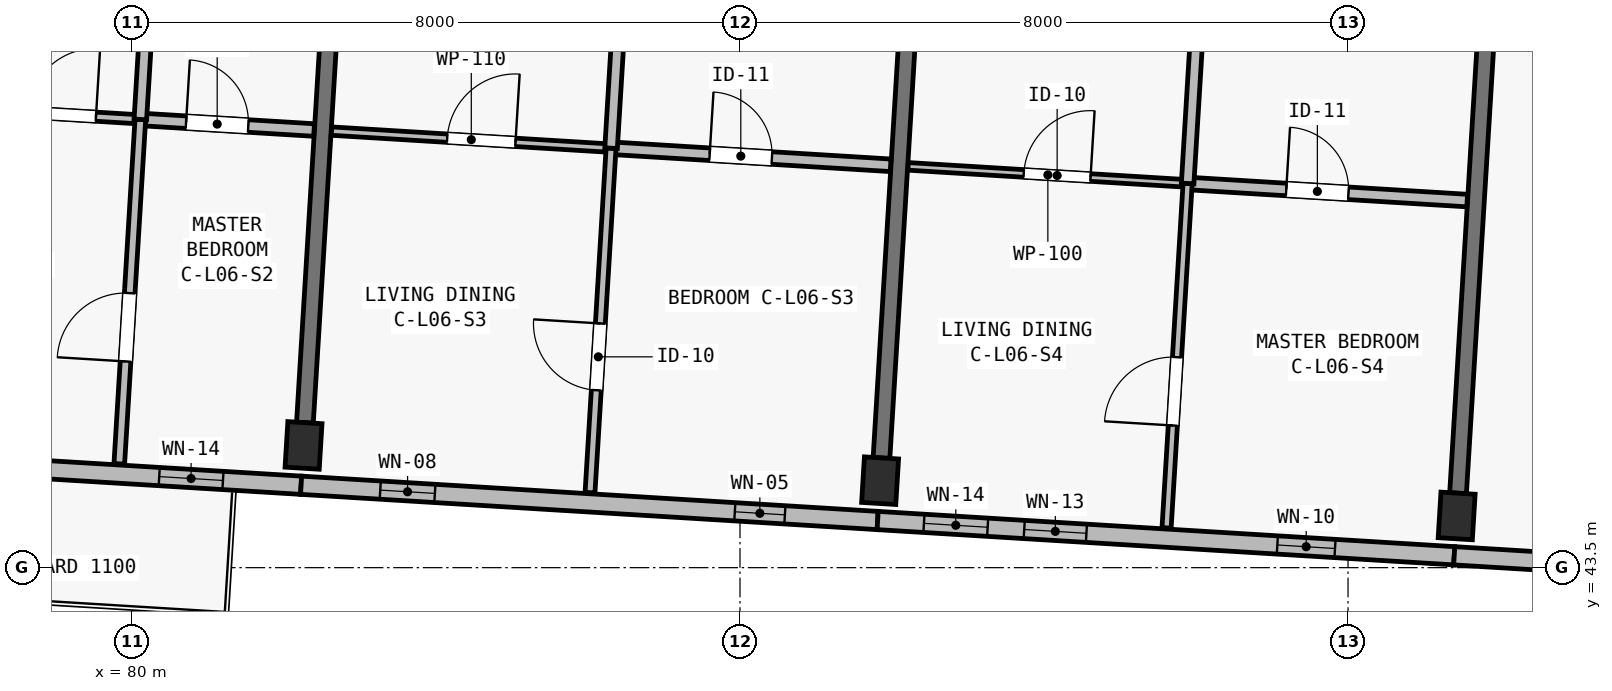
"""IFC4 building model, lengths in metres.
Left out: names, types, materials, properties, quantities, classifications, styles, units other than length and angle.
Written with IfcOpenShell. Run it as: python <this file> out.ifc"""

import sys

from ifc_helpers import new_model, si_unit, direction, frame, frame_2d, origin, origin_2d, place, context, subcontext, project, spatial, rectangle, extrude, element, fill, save


model = new_model("IFC4")
c1 = context("Model", 3, precision=1e-05, world=origin(), true_north=direction((0.0, 1.0)))
c2 = subcontext(c1, "Body", "Model", "MODEL_VIEW")
j1 = project(units=[si_unit("LENGTHUNIT", "METRE"), si_unit("PLANEANGLEUNIT", "RADIAN")], contexts=[c1])
p1 = place(None, origin())
s1 = spatial("IfcSite", under=j1, at=p1, CompositionType="ELEMENT")
p2 = place(p1, origin())
s2 = spatial("IfcBuilding", under=s1, at=p2, CompositionType="ELEMENT")
p3 = place(p2, frame((0.0, 0.0, 21.4)))
s3 = spatial("IfcBuildingStorey", under=s2, at=p3, CompositionType="ELEMENT", Elevation=21.4)
for number, where, z_axis, x_axis in (
    (1, (82.258, 45.108, 0.0), (0.0, 0.0, 1.0), (0.998, -0.061, 0.0)),
    (2, (89.843, 44.644, 0.0), (0.0, 0.0, 1.0), (0.998, -0.061, 0.0)),
    (3, (97.429, 44.18, 0.0), (0.0, 0.0, 1.0), (0.998, -0.061, 0.0)),
):
    element("IfcColumn", number, at=place(p3, frame(where, z_axis=z_axis, x_axis=x_axis)), inside=s3, PredefinedType="COLUMN", context=c2, shape_type="SweptSolid", body=[
        extrude(rectangle(XDim=0.45, YDim=0.6, at=origin_2d()), origin(), (0.0, 0.0, 1.0), 3.25),
    ])
for number, where, z_axis, x_axis in (
    (4, (82.276, 45.407, 0.0), (0.0, 0.0, 1.0), (0.061, 0.998, 0.0)),
    (5, (89.862, 44.944, 0.0), (0.0, 0.0, 1.0), (0.061, 0.998, 0.0)),
    (6, (97.448, 44.479, 0.0), (0.0, 0.0, 1.0), (0.061, 0.998, 0.0)),
):
    element("IfcWall", number, at=place(p3, frame(where, z_axis=z_axis, x_axis=x_axis)), inside=s3, PredefinedType="SHEAR", context=c2, shape_type="SweptSolid", body=[
        extrude(rectangle(XDim=7.0, YDim=0.22, at=frame_2d((3.5, 0.0))), origin(), (0.0, 0.0, 1.0), 2.5),
    ])
p4 = place(p3, frame((82.225, 44.584, 0.0), z_axis=(0.0, 0.0, 1.0), x_axis=(-0.998133591969, 0.061068261669, 0.0)))
e7 = element("IfcWall", 7, at=p4, inside=s3, PredefinedType="SOLIDWALL", context=c2, shape_type="SweptSolid", body=[
    extrude(rectangle(XDim=7.6, YDim=0.24, at=frame_2d((3.8, 0.0))), origin(), (0.0, 0.0, 1.0), 3.0),
])
p5 = place(p4, frame((5.169, 0.0, 0.0)))
e8 = element("IfcOpeningElement", 8, at=p5, cuts=e7, PredefinedType="OPENING", context=c2, shape_type="SweptSolid", body=[
    extrude(rectangle(XDim=1.5, YDim=2.12, at=frame_2d((0.75, 1.06))), frame((0.0, 0.135, 0.0), z_axis=(0.0, -1.0, 0.0), x_axis=(1.0, 0.0, 0.0)), (0.0, 0.0, 1.0), 0.27),
])
p6 = place(p4, frame((1.03, 0.0, 0.5)))
e9 = element("IfcOpeningElement", 9, at=p6, cuts=e7, PredefinedType="OPENING", context=c2, shape_type="SweptSolid", body=[
    extrude(rectangle(XDim=0.84, YDim=2.28, at=frame_2d((0.42, 1.14))), frame((0.0, 0.135, 0.0), z_axis=(0.0, -1.0, 0.0), x_axis=(1.0, 0.0, 0.0)), (0.0, 0.0, 1.0), 0.27),
])
p7 = place(p3, frame((89.811, 44.12, 0.0), z_axis=(0.0, 0.0, 1.0), x_axis=(-0.998135669243, 0.061034300063, 0.0)))
e10 = element("IfcWall", 10, at=p7, inside=s3, PredefinedType="SOLIDWALL", context=c2, shape_type="SweptSolid", body=[
    extrude(rectangle(XDim=7.6, YDim=0.24, at=frame_2d((3.8, 0.0))), origin(), (0.0, 0.0, 1.0), 3.0),
])
p8 = place(p7, frame((1.223, 0.0, 0.42)))
e11 = element("IfcOpeningElement", 11, at=p8, cuts=e10, PredefinedType="OPENING", context=c2, shape_type="SweptSolid", body=[
    extrude(rectangle(XDim=0.66, YDim=2.32, at=frame_2d((0.33, 1.16))), frame((0.0, 0.135, 0.0), z_axis=(0.0, -1.0, 0.0), x_axis=(1.0, 0.0, 0.0)), (0.0, 0.0, 1.0), 0.27),
])
p9 = place(p7, frame((5.837, 0.0, 0.42)))
e12 = element("IfcOpeningElement", 12, at=p9, cuts=e10, PredefinedType="OPENING", context=c2, shape_type="SweptSolid", body=[
    extrude(rectangle(XDim=0.72, YDim=2.16, at=frame_2d((0.36, 1.08))), frame((0.0, 0.135, 0.0), z_axis=(0.0, -1.0, 0.0), x_axis=(1.0, 0.0, 0.0)), (0.0, 0.0, 1.0), 0.27),
])
p10 = place(p3, frame((97.397, 43.656, 0.0), z_axis=(0.0, 0.0, 1.0), x_axis=(-0.998135549572, 0.061036257095, 0.0)))
e13 = element("IfcWall", 13, at=p10, inside=s3, PredefinedType="SOLIDWALL", context=c2, shape_type="SweptSolid", body=[
    extrude(rectangle(XDim=7.6, YDim=0.24, at=frame_2d((3.8, 0.0))), origin(), (0.0, 0.0, 1.0), 3.0),
])
p11 = place(p10, frame((1.571, 0.0, 0.48)))
e14 = element("IfcOpeningElement", 14, at=p11, cuts=e13, PredefinedType="OPENING", context=c2, shape_type="SweptSolid", body=[
    extrude(rectangle(XDim=0.76, YDim=2.34, at=frame_2d((0.38, 1.17))), frame((0.0, 0.135, 0.0), z_axis=(0.0, -1.0, 0.0), x_axis=(1.0, 0.0, 0.0)), (0.0, 0.0, 1.0), 0.27),
])
p12 = place(p10, frame((4.848, 0.0, 0.48)))
e15 = element("IfcOpeningElement", 15, at=p12, cuts=e13, PredefinedType="OPENING", context=c2, shape_type="SweptSolid", body=[
    extrude(rectangle(XDim=0.82, YDim=2.18, at=frame_2d((0.41, 1.09))), frame((0.0, 0.135, 0.0), z_axis=(0.0, -1.0, 0.0), x_axis=(1.0, 0.0, 0.0)), (0.0, 0.0, 1.0), 0.27),
])
p13 = place(p10, frame((6.15, 0.0, 0.52)))
e16 = element("IfcOpeningElement", 16, at=p13, cuts=e13, PredefinedType="OPENING", context=c2, shape_type="SweptSolid", body=[
    extrude(rectangle(XDim=0.84, YDim=2.28, at=frame_2d((0.42, 1.14))), frame((0.0, 0.135, 0.0), z_axis=(0.0, -1.0, 0.0), x_axis=(1.0, 0.0, 0.0)), (0.0, 0.0, 1.0), 0.27),
])
p14 = place(p3, frame((105.507, 43.16, 0.0), z_axis=(0.0, 0.0, 1.0), x_axis=(-0.998134248939, 0.061057522844, 0.0)))
e17 = element("IfcWall", 17, at=p14, inside=s3, PredefinedType="SOLIDWALL", context=c2, shape_type="SweptSolid", body=[
    extrude(rectangle(XDim=8.125, YDim=0.24, at=frame_2d((4.062, 0.0))), origin(), (0.0, 0.0, 1.0), 3.0),
])
p15 = place(p14, frame((1.682, 0.0, 0.5)))
e18 = element("IfcOpeningElement", 18, at=p15, cuts=e17, PredefinedType="OPENING", context=c2, shape_type="SweptSolid", body=[
    extrude(rectangle(XDim=0.86, YDim=2.36, at=frame_2d((0.43, 1.18))), frame((0.0, 0.135, 0.0), z_axis=(0.0, -1.0, 0.0), x_axis=(1.0, 0.0, 0.0)), (0.0, 0.0, 1.0), 0.27),
])
p16 = place(p14, frame((4.347, 0.0, 0.52)))
e19 = element("IfcOpeningElement", 19, at=p16, cuts=e17, PredefinedType="OPENING", context=c2, shape_type="SweptSolid", body=[
    extrude(rectangle(XDim=0.62, YDim=2.28, at=frame_2d((0.31, 1.14))), frame((0.0, 0.135, 0.0), z_axis=(0.0, -1.0, 0.0), x_axis=(1.0, 0.0, 0.0)), (0.0, 0.0, 1.0), 0.27),
])
p17 = place(p3, frame((75.04, 49.707, 0.0), z_axis=(0.0, 0.0, 1.0), x_axis=(0.998135637207, -0.061034823981, 0.0)))
e20 = element("IfcWall", 20, at=p17, inside=s3, PredefinedType="PARTITIONING", context=c2, shape_type="SweptSolid", body=[
    extrude(rectangle(XDim=5.08, YDim=0.12, at=frame_2d((2.54, 0.0))), origin(), (0.0, 0.0, 1.0), 2.97),
])
p18 = place(p17, frame((3.595, 0.0, 0.0)))
e21 = element("IfcOpeningElement", 21, at=p18, cuts=e20, PredefinedType="OPENING", context=c2, shape_type="SweptSolid", body=[
    extrude(rectangle(XDim=0.9, YDim=2.1, at=frame_2d((0.45, 1.05))), frame((0.0, 0.075, 0.0), z_axis=(0.0, -1.0, 0.0), x_axis=(1.0, 0.0, 0.0)), (0.0, 0.0, 1.0), 0.15),
])
p19 = place(p3, frame((80.11, 49.397, 0.0), z_axis=(0.0, 0.0, 1.0), x_axis=(0.99813222782, -0.061090553999, 0.0)))
e22 = element("IfcWall", 22, at=p19, inside=s3, PredefinedType="PLUMBINGWALL", context=c2, shape_type="SweptSolid", body=[
    extrude(rectangle(XDim=2.29, YDim=0.165, at=frame_2d((1.145, 0.0))), origin(), (0.0, 0.0, 1.0), 2.97),
])
p20 = place(p19, frame((0.603, 0.0, 0.0)))
e23 = element("IfcOpeningElement", 23, at=p20, cuts=e22, PredefinedType="OPENING", context=c2, shape_type="SweptSolid", body=[
    extrude(rectangle(XDim=0.82, YDim=2.08, at=frame_2d((0.41, 1.04))), frame((0.0, 0.097, 0.0), z_axis=(0.0, -1.0, 0.0), x_axis=(1.0, 0.0, 0.0)), (0.0, 0.0, 1.0), 0.195),
])
p21 = place(p3, frame((79.833, 44.866, 0.0), z_axis=(0.0, 0.0, 1.0), x_axis=(0.061035713941, 0.998135582786, 0.0)))
e24 = element("IfcWall", 24, at=p21, inside=s3, PredefinedType="PARTITIONING", context=c2, shape_type="SweptSolid", body=[
    extrude(rectangle(XDim=4.54, YDim=0.14, at=frame_2d((2.27, 0.0))), origin(), (0.0, 0.0, 1.0), 2.97),
])
p22 = place(p21, frame((1.35, 0.0, 0.0)))
e25 = element("IfcOpeningElement", 25, at=p22, cuts=e24, PredefinedType="OPENING", context=c2, shape_type="SweptSolid", body=[
    extrude(rectangle(XDim=0.9, YDim=2.1, at=frame_2d((0.45, 1.05))), frame((0.0, 0.085, 0.0), z_axis=(0.0, -1.0, 0.0), x_axis=(1.0, 0.0, 0.0)), (0.0, 0.0, 1.0), 0.17),
])
p23 = place(p3, frame((80.11, 49.397, 0.0), z_axis=(0.0, 0.0, 1.0), x_axis=(0.061066453301, 0.998133702608, 0.0)))
e26 = element("IfcWall", 26, at=p23, inside=s3, PredefinedType="PLUMBINGWALL", context=c2, shape_type="SweptSolid", body=[
    extrude(rectangle(XDim=3.87, YDim=0.165, at=frame_2d((1.935, 0.0))), origin(), (0.0, 0.0, 1.0), 2.97),
])
p24 = place(p3, frame((82.625, 49.243, 0.0), z_axis=(0.0, 0.0, 1.0), x_axis=(0.998132682596, -0.061083123148, 0.0)))
e27 = element("IfcWall", 27, at=p24, inside=s3, PredefinedType="PARTITIONING", context=c2, shape_type="SweptSolid", body=[
    extrude(rectangle(XDim=3.685, YDim=0.11, at=frame_2d((1.843, 0.0))), origin(), (0.0, 0.0, 1.0), 2.97),
])
p25 = place(p24, frame((1.525, 0.0, 0.0)))
e28 = element("IfcOpeningElement", 28, at=p25, cuts=e27, PredefinedType="OPENING", context=c2, shape_type="SweptSolid", body=[
    extrude(rectangle(XDim=0.9, YDim=2.1, at=frame_2d((0.45, 1.05))), frame((0.0, 0.07, 0.0), z_axis=(0.0, -1.0, 0.0), x_axis=(1.0, 0.0, 0.0)), (0.0, 0.0, 1.0), 0.14),
])
p26 = place(p3, frame((86.304, 49.018, 0.0), z_axis=(0.0, 0.0, 1.0), x_axis=(0.998136719672, -0.061017119263, 0.0)))
e29 = element("IfcWall", 29, at=p26, inside=s3, PredefinedType="PLUMBINGWALL", context=c2, shape_type="SweptSolid", body=[
    extrude(rectangle(XDim=3.685, YDim=0.165, at=frame_2d((1.843, 0.0))), origin(), (0.0, 0.0, 1.0), 2.97),
])
p27 = place(p26, frame((1.3, 0.0, 0.0)))
e30 = element("IfcOpeningElement", 30, at=p27, cuts=e29, PredefinedType="OPENING", context=c2, shape_type="SweptSolid", body=[
    extrude(rectangle(XDim=0.82, YDim=2.08, at=frame_2d((0.41, 1.04))), frame((0.0, 0.097, 0.0), z_axis=(0.0, -1.0, 0.0), x_axis=(1.0, 0.0, 0.0)), (0.0, 0.0, 1.0), 0.195),
])
p28 = place(p3, frame((86.027, 44.487, 0.0), z_axis=(0.0, 0.0, 1.0), x_axis=(0.061035713941, 0.998135582786, 0.0)))
e31 = element("IfcWall", 31, at=p28, inside=s3, PredefinedType="PARTITIONING", context=c2, shape_type="SweptSolid", body=[
    extrude(rectangle(XDim=4.54, YDim=0.13, at=frame_2d((2.27, 0.0))), origin(), (0.0, 0.0, 1.0), 2.97),
])
p29 = place(p28, frame((1.35, 0.0, 0.0)))
e32 = element("IfcOpeningElement", 32, at=p29, cuts=e31, PredefinedType="OPENING", context=c2, shape_type="SweptSolid", body=[
    extrude(rectangle(XDim=0.88, YDim=2.1, at=frame_2d((0.44, 1.05))), frame((0.0, 0.08, 0.0), z_axis=(0.0, -1.0, 0.0), x_axis=(1.0, 0.0, 0.0)), (0.0, 0.0, 1.0), 0.16),
])
p30 = place(p3, frame((86.304, 49.018, 0.0), z_axis=(0.0, 0.0, 1.0), x_axis=(0.061066453301, 0.998133702608, 0.0)))
e33 = element("IfcWall", 33, at=p30, inside=s3, PredefinedType="PLUMBINGWALL", context=c2, shape_type="SweptSolid", body=[
    extrude(rectangle(XDim=3.87, YDim=0.165, at=frame_2d((1.935, 0.0))), origin(), (0.0, 0.0, 1.0), 2.97),
])
p31 = place(p3, frame((90.211, 48.779, 0.0), z_axis=(0.0, 0.0, 1.0), x_axis=(0.998136719672, -0.061017119263, 0.0)))
e34 = element("IfcWall", 34, at=p31, inside=s3, PredefinedType="PARTITIONING", context=c2, shape_type="SweptSolid", body=[
    extrude(rectangle(XDim=3.685, YDim=0.1, at=frame_2d((1.843, 0.0))), origin(), (0.0, 0.0, 1.0), 2.97),
])
p32 = place(p31, frame((1.525, 0.0, 0.0)))
e35 = element("IfcOpeningElement", 35, at=p32, cuts=e34, PredefinedType="OPENING", context=c2, shape_type="SweptSolid", body=[
    extrude(rectangle(XDim=0.88, YDim=2.1, at=frame_2d((0.44, 1.05))), frame((0.0, 0.065, 0.0), z_axis=(0.0, -1.0, 0.0), x_axis=(1.0, 0.0, 0.0)), (0.0, 0.0, 1.0), 0.13),
])
p33 = place(p3, frame((93.89, 48.554, 0.0), z_axis=(0.0, 0.0, 1.0), x_axis=(0.99813243538, -0.061087162657, 0.0)))
e36 = element("IfcWall", 36, at=p33, inside=s3, PredefinedType="PLUMBINGWALL", context=c2, shape_type="SweptSolid", body=[
    extrude(rectangle(XDim=3.685, YDim=0.165, at=frame_2d((1.842, 0.0))), origin(), (0.0, 0.0, 1.0), 2.97),
])
p34 = place(p33, frame((1.3, 0.0, 0.0)))
e37 = element("IfcOpeningElement", 37, at=p34, cuts=e36, PredefinedType="OPENING", context=c2, shape_type="SweptSolid", body=[
    extrude(rectangle(XDim=0.82, YDim=2.08, at=frame_2d((0.41, 1.04))), frame((0.0, 0.097, 0.0), z_axis=(0.0, -1.0, 0.0), x_axis=(1.0, 0.0, 0.0)), (0.0, 0.0, 1.0), 0.195),
])
p35 = place(p3, frame((93.612, 44.023, 0.0), z_axis=(0.0, 0.0, 1.0), x_axis=(0.061089289302, 0.998132305224, 0.0)))
e38 = element("IfcWall", 38, at=p35, inside=s3, PredefinedType="PARTITIONING", context=c2, shape_type="SweptSolid", body=[
    extrude(rectangle(XDim=4.54, YDim=0.12, at=frame_2d((2.27, 0.0))), origin(), (0.0, 0.0, 1.0), 2.97),
])
p36 = place(p35, frame((1.35, 0.0, 0.0)))
e39 = element("IfcOpeningElement", 39, at=p36, cuts=e38, PredefinedType="OPENING", context=c2, shape_type="SweptSolid", body=[
    extrude(rectangle(XDim=0.9, YDim=2.1, at=frame_2d((0.45, 1.05))), frame((0.0, 0.075, 0.0), z_axis=(0.0, -1.0, 0.0), x_axis=(1.0, 0.0, 0.0)), (0.0, 0.0, 1.0), 0.15),
])
p37 = place(p3, frame((93.89, 48.554, 0.0), z_axis=(0.0, 0.0, 1.0), x_axis=(0.06100360301, 0.998137545842, 0.0)))
e40 = element("IfcWall", 40, at=p37, inside=s3, PredefinedType="PLUMBINGWALL", context=c2, shape_type="SweptSolid", body=[
    extrude(rectangle(XDim=3.87, YDim=0.165, at=frame_2d((1.935, 0.0))), origin(), (0.0, 0.0, 1.0), 2.97),
])
p38 = place(p6, origin())
e41 = element("IfcWindow", 41, at=p38, inside=s3, PartitioningType="SINGLE_PANEL", PredefinedType="WINDOW", context=c2, shape_type="SweptSolid", body=[
    extrude(rectangle(XDim=0.84, YDim=2.28, at=frame_2d((0.42, 1.14))), frame((0.0, 0.03, 0.0), z_axis=(0.0, -1.0, 0.0), x_axis=(1.0, 0.0, 0.0)), (0.0, 0.0, 1.0), 0.06),
])
fill(e9, e41)
p39 = place(p8, origin())
e42 = element("IfcWindow", 42, at=p39, inside=s3, PartitioningType="SINGLE_PANEL", PredefinedType="WINDOW", context=c2, shape_type="SweptSolid", body=[
    extrude(rectangle(XDim=0.66, YDim=2.32, at=frame_2d((0.33, 1.16))), frame((0.0, 0.03, 0.0), z_axis=(0.0, -1.0, 0.0), x_axis=(1.0, 0.0, 0.0)), (0.0, 0.0, 1.0), 0.06),
])
fill(e11, e42)
p40 = place(p9, origin())
e43 = element("IfcWindow", 43, at=p40, inside=s3, PartitioningType="SINGLE_PANEL", PredefinedType="WINDOW", context=c2, shape_type="SweptSolid", body=[
    extrude(rectangle(XDim=0.72, YDim=2.16, at=frame_2d((0.36, 1.08))), frame((0.0, 0.03, 0.0), z_axis=(0.0, -1.0, 0.0), x_axis=(1.0, 0.0, 0.0)), (0.0, 0.0, 1.0), 0.06),
])
fill(e12, e43)
p41 = place(p11, origin())
e44 = element("IfcWindow", 44, at=p41, inside=s3, PartitioningType="SINGLE_PANEL", PredefinedType="WINDOW", context=c2, shape_type="SweptSolid", body=[
    extrude(rectangle(XDim=0.76, YDim=2.34, at=frame_2d((0.38, 1.17))), frame((0.0, 0.03, 0.0), z_axis=(0.0, -1.0, 0.0), x_axis=(1.0, 0.0, 0.0)), (0.0, 0.0, 1.0), 0.06),
])
fill(e14, e44)
p42 = place(p12, origin())
e45 = element("IfcWindow", 45, at=p42, inside=s3, PartitioningType="SINGLE_PANEL", PredefinedType="WINDOW", context=c2, shape_type="SweptSolid", body=[
    extrude(rectangle(XDim=0.82, YDim=2.18, at=frame_2d((0.41, 1.09))), frame((0.0, 0.03, 0.0), z_axis=(0.0, -1.0, 0.0), x_axis=(1.0, 0.0, 0.0)), (0.0, 0.0, 1.0), 0.06),
])
fill(e15, e45)
p43 = place(p13, origin())
e46 = element("IfcWindow", 46, at=p43, inside=s3, PartitioningType="SINGLE_PANEL", PredefinedType="WINDOW", context=c2, shape_type="SweptSolid", body=[
    extrude(rectangle(XDim=0.84, YDim=2.28, at=frame_2d((0.42, 1.14))), frame((0.0, 0.03, 0.0), z_axis=(0.0, -1.0, 0.0), x_axis=(1.0, 0.0, 0.0)), (0.0, 0.0, 1.0), 0.06),
])
fill(e16, e46)
p44 = place(p18, origin())
e47 = element("IfcDoor", 47, at=p44, inside=s3, OperationType="SINGLE_SWING_RIGHT", PredefinedType="DOOR", context=c2, shape_type="SweptSolid", body=[
    extrude(rectangle(XDim=0.9, YDim=2.1, at=frame_2d((0.45, 1.05))), frame((0.0, 0.025, 0.0), z_axis=(0.0, -1.0, 0.0), x_axis=(1.0, 0.0, 0.0)), (0.0, 0.0, 1.0), 0.05),
])
fill(e21, e47)
p45 = place(p20, origin())
e48 = element("IfcDoor", 48, at=p45, inside=s3, OperationType="SINGLE_SWING_LEFT", PredefinedType="DOOR", context=c2, shape_type="SweptSolid", body=[
    extrude(rectangle(XDim=0.82, YDim=2.08, at=frame_2d((0.41, 1.04))), frame((0.0, 0.025, 0.0), z_axis=(0.0, -1.0, 0.0), x_axis=(1.0, 0.0, 0.0)), (0.0, 0.0, 1.0), 0.05),
])
fill(e23, e48)
p46 = place(p22, origin())
e49 = element("IfcDoor", 49, at=p46, inside=s3, OperationType="SINGLE_SWING_LEFT", PredefinedType="DOOR", context=c2, shape_type="SweptSolid", body=[
    extrude(rectangle(XDim=0.9, YDim=2.1, at=frame_2d((0.45, 1.05))), frame((0.0, 0.025, 0.0), z_axis=(0.0, -1.0, 0.0), x_axis=(1.0, 0.0, 0.0)), (0.0, 0.0, 1.0), 0.05),
])
fill(e25, e49)
p47 = place(p25, origin())
e50 = element("IfcDoor", 50, at=p47, inside=s3, OperationType="SINGLE_SWING_RIGHT", PredefinedType="DOOR", context=c2, shape_type="SweptSolid", body=[
    extrude(rectangle(XDim=0.9, YDim=2.1, at=frame_2d((0.45, 1.05))), frame((0.0, 0.025, 0.0), z_axis=(0.0, -1.0, 0.0), x_axis=(1.0, 0.0, 0.0)), (0.0, 0.0, 1.0), 0.05),
])
fill(e28, e50)
p48 = place(p27, origin())
e51 = element("IfcDoor", 51, at=p48, inside=s3, OperationType="SINGLE_SWING_LEFT", PredefinedType="DOOR", context=c2, shape_type="SweptSolid", body=[
    extrude(rectangle(XDim=0.82, YDim=2.08, at=frame_2d((0.41, 1.04))), frame((0.0, 0.025, 0.0), z_axis=(0.0, -1.0, 0.0), x_axis=(1.0, 0.0, 0.0)), (0.0, 0.0, 1.0), 0.05),
])
fill(e30, e51)
p49 = place(p29, origin())
e52 = element("IfcDoor", 52, at=p49, inside=s3, OperationType="SINGLE_SWING_RIGHT", PredefinedType="DOOR", context=c2, shape_type="SweptSolid", body=[
    extrude(rectangle(XDim=0.88, YDim=2.1, at=frame_2d((0.44, 1.05))), frame((0.0, 0.025, 0.0), z_axis=(0.0, -1.0, 0.0), x_axis=(1.0, 0.0, 0.0)), (0.0, 0.0, 1.0), 0.05),
])
fill(e32, e52)
p50 = place(p32, origin())
e53 = element("IfcDoor", 53, at=p50, inside=s3, OperationType="SINGLE_SWING_RIGHT", PredefinedType="DOOR", context=c2, shape_type="SweptSolid", body=[
    extrude(rectangle(XDim=0.88, YDim=2.1, at=frame_2d((0.44, 1.05))), frame((0.0, 0.025, 0.0), z_axis=(0.0, -1.0, 0.0), x_axis=(1.0, 0.0, 0.0)), (0.0, 0.0, 1.0), 0.05),
])
fill(e35, e53)
p51 = place(p34, origin())
e54 = element("IfcDoor", 54, at=p51, inside=s3, OperationType="SINGLE_SWING_LEFT", PredefinedType="DOOR", context=c2, shape_type="SweptSolid", body=[
    extrude(rectangle(XDim=0.82, YDim=2.08, at=frame_2d((0.41, 1.04))), frame((0.0, 0.025, 0.0), z_axis=(0.0, -1.0, 0.0), x_axis=(1.0, 0.0, 0.0)), (0.0, 0.0, 1.0), 0.05),
])
fill(e37, e54)
p52 = place(p36, origin())
e55 = element("IfcDoor", 55, at=p52, inside=s3, OperationType="SINGLE_SWING_LEFT", PredefinedType="DOOR", context=c2, shape_type="SweptSolid", body=[
    extrude(rectangle(XDim=0.9, YDim=2.1, at=frame_2d((0.45, 1.05))), frame((0.0, 0.025, 0.0), z_axis=(0.0, -1.0, 0.0), x_axis=(1.0, 0.0, 0.0)), (0.0, 0.0, 1.0), 0.05),
])
fill(e39, e55)
save(model, sys.argv[1])
